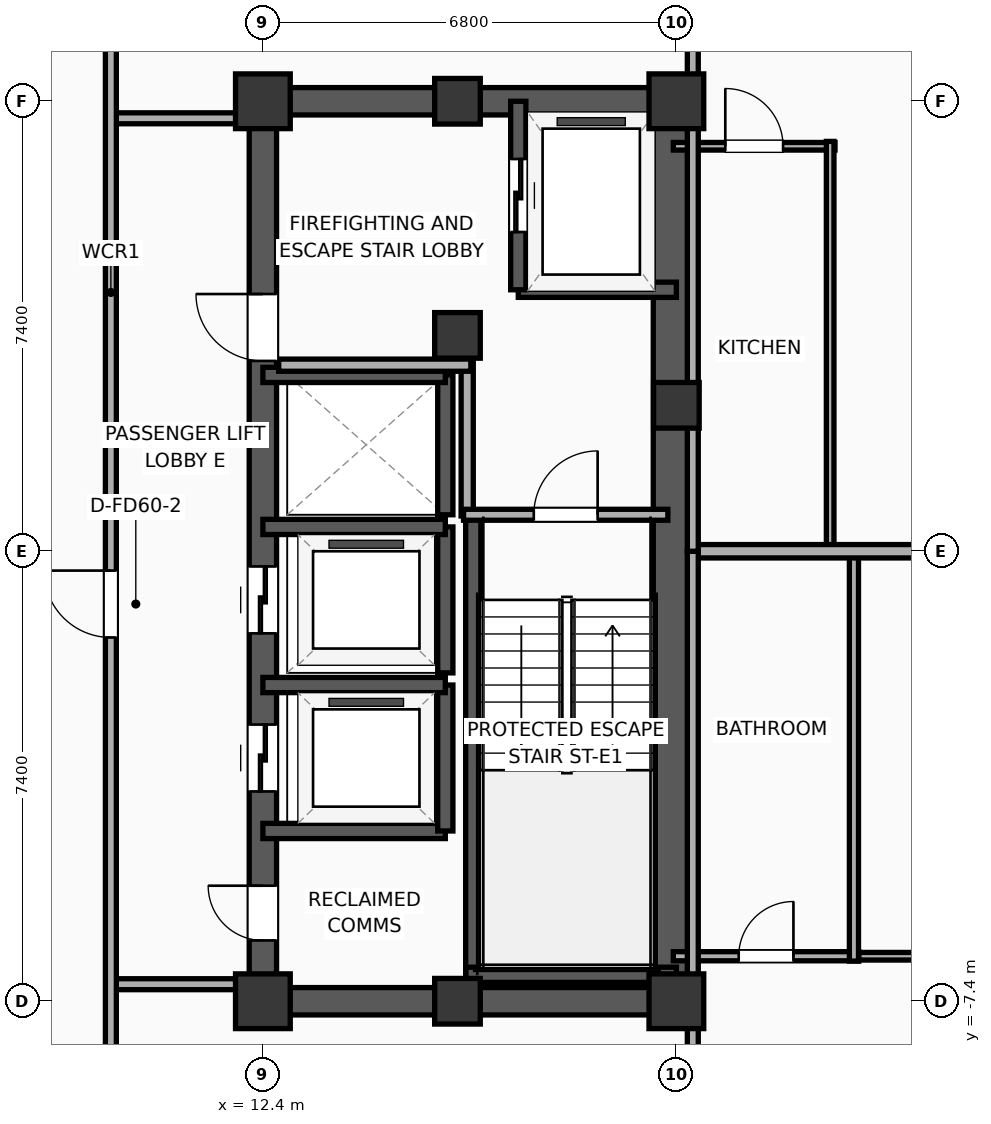
"""IFC4 building model, lengths in metres.
Left out: names, types, materials, properties, quantities, classifications, styles, units other than length and angle.
Written with IfcOpenShell. Run it as: python <this file> out.ifc"""

import sys

from ifc_helpers import new_model, si_unit, direction, frame, frame_2d, origin, origin_2d, place, context, subcontext, project, spatial, rectangle, extrude, element, fill, save


model = new_model("IFC4")
c1 = context("Model", 3, precision=1e-05, world=origin(), true_north=direction((0.0, 1.0)))
c2 = subcontext(c1, "Body", "Model", "MODEL_VIEW")
j1 = project(units=[si_unit("LENGTHUNIT", "METRE"), si_unit("PLANEANGLEUNIT", "RADIAN")], contexts=[c1])
p1 = place(None, origin())
s1 = spatial("IfcSite", under=j1, at=p1, CompositionType="ELEMENT")
p2 = place(p1, origin())
s2 = spatial("IfcBuilding", under=s1, at=p2, CompositionType="ELEMENT")
p3 = place(p2, frame((0.0, 0.0, 144.3)))
s3 = spatial("IfcBuildingStorey", under=s2, at=p3, CompositionType="ELEMENT", Elevation=144.3)
p4 = place(p3, frame((12.4, -7.4, 0.0), z_axis=(0.0, 0.0, 1.0), x_axis=(1.0, 0.0, 0.0)))
e1 = element("IfcColumn", 1, at=p4, inside=s3, PredefinedType="COLUMN", context=c2, shape_type="SweptSolid", body=[
    extrude(rectangle(XDim=0.9, YDim=0.9, at=origin_2d()), origin(), (0.0, 0.0, 1.0), 3.9),
])
p5 = place(p3, frame((15.6, 3.55, 0.0), z_axis=(0.0, 0.0, 1.0), x_axis=(1.0, 0.0, 0.0)))
e2 = element("IfcColumn", 2, at=p5, inside=s3, PredefinedType="COLUMN", context=c2, shape_type="SweptSolid", body=[
    extrude(rectangle(XDim=0.75, YDim=0.75, at=origin_2d()), origin(), (0.0, 0.0, 1.0), 3.9),
])
p6 = place(p3, frame((12.4, 7.4, 0.0), z_axis=(0.0, 0.0, 1.0), x_axis=(1.0, 0.0, 0.0)))
e3 = element("IfcColumn", 3, at=p6, inside=s3, PredefinedType="COLUMN", context=c2, shape_type="SweptSolid", body=[
    extrude(rectangle(XDim=0.9, YDim=0.9, at=origin_2d()), origin(), (0.0, 0.0, 1.0), 3.9),
])
for number, where, z_axis, x_axis in (
    (4, (15.6, -7.4, 0.0), (0.0, 0.0, 1.0), (1.0, 0.0, 0.0)),
    (5, (15.6, 7.4, 0.0), (0.0, 0.0, 1.0), (1.0, 0.0, 0.0)),
):
    element("IfcColumn", number, at=place(p3, frame(where, z_axis=z_axis, x_axis=x_axis)), inside=s3, PredefinedType="COLUMN", context=c2, shape_type="SweptSolid", body=[
        extrude(rectangle(XDim=0.75, YDim=0.75, at=origin_2d()), origin(), (0.0, 0.0, 1.0), 3.9),
    ])
p7 = place(p3, frame((19.2, -7.4, 0.0), z_axis=(0.0, 0.0, 1.0), x_axis=(1.0, 0.0, 0.0)))
e6 = element("IfcColumn", 6, at=p7, inside=s3, PredefinedType="COLUMN", context=c2, shape_type="SweptSolid", body=[
    extrude(rectangle(XDim=0.9, YDim=0.9, at=origin_2d()), origin(), (0.0, 0.0, 1.0), 3.9),
])
p8 = place(p3, frame((19.2, 2.4, 0.0), z_axis=(0.0, 0.0, 1.0), x_axis=(1.0, 0.0, 0.0)))
e7 = element("IfcColumn", 7, at=p8, inside=s3, PredefinedType="COLUMN", context=c2, shape_type="SweptSolid", body=[
    extrude(rectangle(XDim=0.75, YDim=0.75, at=origin_2d()), origin(), (0.0, 0.0, 1.0), 3.9),
])
p9 = place(p3, frame((19.2, 7.4, 0.0), z_axis=(0.0, 0.0, 1.0), x_axis=(1.0, 0.0, 0.0)))
e8 = element("IfcColumn", 8, at=p9, inside=s3, PredefinedType="COLUMN", context=c2, shape_type="SweptSolid", body=[
    extrude(rectangle(XDim=0.9, YDim=0.9, at=origin_2d()), origin(), (0.0, 0.0, 1.0), 3.9),
])
for number, where, z_axis, x_axis in (
    (9, (12.175, -7.4, 0.0), (0.0, 0.0, 1.0), (1.0, 0.0, 0.0)),
    (10, (12.175, 7.4, 0.0), (0.0, 0.0, 1.0), (1.0, 0.0, 0.0)),
):
    element("IfcWall", number, at=place(p3, frame(where, z_axis=z_axis, x_axis=x_axis)), inside=s3, PredefinedType="SHEAR", context=c2, shape_type="SweptSolid", body=[
        extrude(rectangle(XDim=7.25, YDim=0.45, at=frame_2d((3.625, 0.0))), origin(), (0.0, 0.0, 1.0), 3.65),
    ])
p10 = place(p3, frame((12.4, -7.4, 0.0), z_axis=(0.0, 0.0, 1.0), x_axis=(0.0, 1.0, 0.0)))
e11 = element("IfcWall", 11, at=p10, inside=s3, PredefinedType="SHEAR", context=c2, shape_type="SweptSolid", body=[
    extrude(rectangle(XDim=14.8, YDim=0.45, at=frame_2d((7.4, 0.0))), origin(), (0.0, 0.0, 1.0), 3.65),
])
p11 = place(p10, frame((3.45, 0.0, 0.0)))
e12 = element("IfcOpeningElement", 12, at=p11, cuts=e11, PredefinedType="OPENING", context=c2, shape_type="SweptSolid", body=[
    extrude(rectangle(XDim=1.1, YDim=2.05, at=frame_2d((0.55, 1.025))), frame((0.0, 0.235, 0.0), z_axis=(0.0, -1.0, 0.0), x_axis=(1.0, 0.0, 0.0)), (0.0, 0.0, 1.0), 0.47),
])
p12 = place(p10, frame((6.05, 0.0, 0.0)))
e13 = element("IfcOpeningElement", 13, at=p12, cuts=e11, PredefinedType="OPENING", context=c2, shape_type="SweptSolid", body=[
    extrude(rectangle(XDim=1.1, YDim=2.05, at=frame_2d((0.55, 1.025))), frame((0.0, 0.235, 0.0), z_axis=(0.0, -1.0, 0.0), x_axis=(1.0, 0.0, 0.0)), (0.0, 0.0, 1.0), 0.47),
])
p13 = place(p10, frame((10.53, 0.0, 0.0)))
e14 = element("IfcOpeningElement", 14, at=p13, cuts=e11, PredefinedType="OPENING", context=c2, shape_type="SweptSolid", body=[
    extrude(rectangle(XDim=1.1, YDim=2.05, at=frame_2d((0.55, 1.025))), frame((0.0, 0.235, 0.0), z_axis=(0.0, -1.0, 0.0), x_axis=(1.0, 0.0, 0.0)), (0.0, 0.0, 1.0), 0.47),
])
p14 = place(p10, frame((1.0, 0.0, 0.0)))
e15 = element("IfcOpeningElement", 15, at=p14, cuts=e11, PredefinedType="OPENING", context=c2, shape_type="SweptSolid", body=[
    extrude(rectangle(XDim=0.9, YDim=2.05, at=frame_2d((0.45, 1.025))), frame((0.0, 0.235, 0.0), z_axis=(0.0, -1.0, 0.0), x_axis=(1.0, 0.0, 0.0)), (0.0, 0.0, 1.0), 0.47),
])
p15 = place(p3, frame((19.145, -7.4, 0.0), z_axis=(0.0, 0.0, 1.0), x_axis=(0.0, 1.0, 0.0)))
e16 = element("IfcWall", 16, at=p15, inside=s3, PredefinedType="SHEAR", context=c2, shape_type="SweptSolid", body=[
    extrude(rectangle(XDim=14.8, YDim=0.65, at=frame_2d((7.4, 0.0))), origin(), (0.0, 0.0, 1.0), 3.65),
])
p16 = place(p3, frame((15.86, -7.085, 0.0), z_axis=(0.0, 0.0, 1.0), x_axis=(0.0, 1.0, 0.0)))
e17 = element("IfcWall", 17, at=p16, inside=s3, PredefinedType="SOLIDWALL", context=c2, shape_type="SweptSolid", body=[
    extrude(rectangle(XDim=7.685, YDim=0.25, at=frame_2d((3.843, 0.0))), origin(), (0.0, 0.0, 1.0), 3.65),
])
p17 = place(p3, frame((15.74, -6.965, 0.0), z_axis=(0.0, 0.0, 1.0), x_axis=(1.0, 0.0, 0.0)))
e18 = element("IfcWall", 18, at=p17, inside=s3, PredefinedType="SOLIDWALL", context=c2, shape_type="SweptSolid", body=[
    extrude(rectangle(XDim=3.46, YDim=0.25, at=frame_2d((1.73, 0.0))), origin(), (0.0, 0.0, 1.0), 3.65),
])
p18 = place(p3, frame((16.6, 4.3, 0.0), z_axis=(0.0, 0.0, 1.0), x_axis=(1.0, 0.0, 0.0)))
e19 = element("IfcWall", 19, at=p18, inside=s3, PredefinedType="SOLIDWALL", context=c2, shape_type="SweptSolid", body=[
    extrude(rectangle(XDim=2.6, YDim=0.25, at=frame_2d((1.3, 0.0))), origin(), (0.0, 0.0, 1.0), 3.65),
])
p19 = place(p3, frame((16.6, 7.4, 0.0), z_axis=(0.0, 0.0, 1.0), x_axis=(0.0, -1.0, 0.0)))
e20 = element("IfcWall", 20, at=p19, inside=s3, PredefinedType="SOLIDWALL", context=c2, shape_type="SweptSolid", body=[
    extrude(rectangle(XDim=3.1, YDim=0.25, at=frame_2d((1.55, 0.0))), origin(), (0.0, 0.0, 1.0), 3.65),
])
p20 = place(p19, frame((0.95, 0.0, 0.0)))
e21 = element("IfcOpeningElement", 21, at=p20, cuts=e20, PredefinedType="OPENING", context=c2, shape_type="SweptSolid", body=[
    extrude(rectangle(XDim=1.2, YDim=2.05, at=frame_2d((0.6, 1.025))), frame((0.0, 0.135, 0.0), z_axis=(0.0, -1.0, 0.0), x_axis=(1.0, 0.0, 0.0)), (0.0, 0.0, 1.0), 0.27),
])
p21 = place(p3, frame((12.4, -4.6, 0.0), z_axis=(0.0, 0.0, 1.0), x_axis=(1.0, 0.0, 0.0)))
e22 = element("IfcWall", 22, at=p21, inside=s3, PredefinedType="SOLIDWALL", context=c2, shape_type="SweptSolid", body=[
    extrude(rectangle(XDim=3.0, YDim=0.25, at=frame_2d((1.5, 0.0))), origin(), (0.0, 0.0, 1.0), 3.65),
])
p22 = place(p3, frame((15.4, -4.6, 0.0), z_axis=(0.0, 0.0, 1.0), x_axis=(0.0, 1.0, 0.0)))
e23 = element("IfcWall", 23, at=p22, inside=s3, PredefinedType="SOLIDWALL", context=c2, shape_type="SweptSolid", body=[
    extrude(rectangle(XDim=2.4, YDim=0.25, at=frame_2d((1.2, 0.0))), origin(), (0.0, 0.0, 1.0), 3.65),
])
p23 = place(p3, frame((15.4, -2.2, 0.0), z_axis=(0.0, 0.0, 1.0), x_axis=(-1.0, 0.0, 0.0)))
e24 = element("IfcWall", 24, at=p23, inside=s3, PredefinedType="SOLIDWALL", context=c2, shape_type="SweptSolid", body=[
    extrude(rectangle(XDim=3.0, YDim=0.25, at=frame_2d((1.5, 0.0))), origin(), (0.0, 0.0, 1.0), 3.65),
])
p24 = place(p3, frame((15.4, -2.0, 0.0), z_axis=(0.0, 0.0, 1.0), x_axis=(0.0, 1.0, 0.0)))
e25 = element("IfcWall", 25, at=p24, inside=s3, PredefinedType="SOLIDWALL", context=c2, shape_type="SweptSolid", body=[
    extrude(rectangle(XDim=2.4, YDim=0.25, at=frame_2d((1.2, 0.0))), origin(), (0.0, 0.0, 1.0), 3.65),
])
p25 = place(p3, frame((15.4, 0.4, 0.0), z_axis=(0.0, 0.0, 1.0), x_axis=(-1.0, 0.0, 0.0)))
e26 = element("IfcWall", 26, at=p25, inside=s3, PredefinedType="SOLIDWALL", context=c2, shape_type="SweptSolid", body=[
    extrude(rectangle(XDim=3.0, YDim=0.25, at=frame_2d((1.5, 0.0))), origin(), (0.0, 0.0, 1.0), 3.65),
])
p26 = place(p3, frame((15.4, 0.6, 0.0), z_axis=(0.0, 0.0, 1.0), x_axis=(0.0, 1.0, 0.0)))
e27 = element("IfcWall", 27, at=p26, inside=s3, PredefinedType="SOLIDWALL", context=c2, shape_type="SweptSolid", body=[
    extrude(rectangle(XDim=2.3, YDim=0.25, at=frame_2d((1.15, 0.0))), origin(), (0.0, 0.0, 1.0), 3.65),
])
p27 = place(p3, frame((15.4, 2.9, 0.0), z_axis=(0.0, 0.0, 1.0), x_axis=(-1.0, 0.0, 0.0)))
e28 = element("IfcWall", 28, at=p27, inside=s3, PredefinedType="SOLIDWALL", context=c2, shape_type="SweptSolid", body=[
    extrude(rectangle(XDim=3.0, YDim=0.25, at=frame_2d((1.5, 0.0))), origin(), (0.0, 0.0, 1.0), 3.65),
])
p28 = place(p3, frame((15.76, 0.58, 0.0), z_axis=(0.0, 0.0, 1.0), x_axis=(0.0, 1.0, 0.0)))
e29 = element("IfcWall", 29, at=p28, inside=s3, PredefinedType="PARTITIONING", context=c2, shape_type="SweptSolid", body=[
    extrude(rectangle(XDim=2.52, YDim=0.2, at=frame_2d((1.26, 0.0))), origin(), (0.0, 0.0, 1.0), 3.65),
])
p29 = place(p3, frame((12.66, 3.06, 0.0), z_axis=(0.0, 0.0, 1.0), x_axis=(1.0, 0.0, 0.0)))
e30 = element("IfcWall", 30, at=p29, inside=s3, PredefinedType="PARTITIONING", context=c2, shape_type="SweptSolid", body=[
    extrude(rectangle(XDim=3.16, YDim=0.2, at=frame_2d((1.58, 0.0))), origin(), (0.0, 0.0, 1.0), 3.65),
])
p30 = place(p3, frame((15.7, 0.6, 0.0), z_axis=(0.0, 0.0, 1.0), x_axis=(1.0, 0.0, 0.0)))
e31 = element("IfcWall", 31, at=p30, inside=s3, PredefinedType="PARTITIONING", context=c2, shape_type="SweptSolid", body=[
    extrude(rectangle(XDim=3.36, YDim=0.18, at=frame_2d((1.68, 0.0))), origin(), (0.0, 0.0, 1.0), 3.65),
])
p31 = place(p30, frame((1.155, 0.0, 0.0)))
e32 = element("IfcOpeningElement", 32, at=p31, cuts=e31, PredefinedType="OPENING", context=c2, shape_type="SweptSolid", body=[
    extrude(rectangle(XDim=1.05, YDim=2.05, at=frame_2d((0.525, 1.025))), frame((0.0, 0.1, 0.0), z_axis=(0.0, -1.0, 0.0), x_axis=(1.0, 0.0, 0.0)), (0.0, 0.0, 1.0), 0.2),
])
for number, where, z_axis, x_axis in (
    (33, (9.88, 7.12, 0.0), (0.0, 0.0, 1.0), (1.0, 0.0, 0.0)),
    (34, (9.88, -7.12, 0.0), (0.0, 0.0, 1.0), (1.0, 0.0, 0.0)),
):
    element("IfcWall", number, at=place(p3, frame(where, z_axis=z_axis, x_axis=x_axis)), inside=s3, PredefinedType="PARTITIONING", context=c2, shape_type="SweptSolid", body=[
        extrude(rectangle(XDim=2.27, YDim=0.18, at=frame_2d((1.135, 0.0))), origin(), (0.0, 0.0, 1.0), 3.65),
    ])
p32 = place(p3, frame((9.9, -8.68, 0.0), z_axis=(0.0, 0.0, 1.0), x_axis=(0.0, 1.0, 0.0)))
e35 = element("IfcWall", 35, at=p32, inside=s3, PredefinedType="PARTITIONING", context=c2, shape_type="SweptSolid", body=[
    extrude(rectangle(XDim=17.36, YDim=0.18, at=frame_2d((8.68, 0.0))), origin(), (0.0, 0.0, 1.0), 3.65),
])
p33 = place(p32, frame((7.262, 0.0, 0.0)))
e36 = element("IfcOpeningElement", 36, at=p33, cuts=e35, PredefinedType="OPENING", context=c2, shape_type="SweptSolid", body=[
    extrude(rectangle(XDim=1.1, YDim=2.05, at=frame_2d((0.55, 1.025))), frame((0.0, 0.1, 0.0), z_axis=(0.0, -1.0, 0.0), x_axis=(1.0, 0.0, 0.0)), (0.0, 0.0, 1.0), 0.2),
])
p34 = place(p3, frame((22.06, -6.66, 0.0), z_axis=(0.0, 0.0, 1.0), x_axis=(1.0, 0.0, 0.0)))
e37 = element("IfcWall", 37, at=p34, inside=s3, PredefinedType="PARTITIONING", context=c2, shape_type="SweptSolid", body=[
    extrude(rectangle(XDim=5.321, YDim=0.125, at=frame_2d((2.661, 0.0))), origin(), (0.0, 0.0, 1.0), 2.54),
])
p35 = place(p34, frame((1.945, 0.0, 0.0)))
e38 = element("IfcOpeningElement", 38, at=p35, cuts=e37, PredefinedType="OPENING", context=c2, shape_type="SweptSolid", body=[
    extrude(rectangle(XDim=0.9, YDim=2.05, at=frame_2d((0.45, 1.025))), frame((0.0, 0.073, 0.0), z_axis=(0.0, -1.0, 0.0), x_axis=(1.0, 0.0, 0.0)), (0.0, 0.0, 1.0), 0.145),
])
p36 = place(p3, frame((19.15, -6.66, 0.0), z_axis=(0.0, 0.0, 1.0), x_axis=(1.0, 0.0, 0.0)))
e39 = element("IfcWall", 39, at=p36, inside=s3, PredefinedType="PLUMBINGWALL", context=c2, shape_type="SweptSolid", body=[
    extrude(rectangle(XDim=3.05, YDim=0.15, at=frame_2d((1.525, 0.0))), origin(), (0.0, 0.0, 1.0), 2.54),
])
p37 = place(p36, frame((1.075, 0.0, 0.0)))
e40 = element("IfcOpeningElement", 40, at=p37, cuts=e39, PredefinedType="OPENING", context=c2, shape_type="SweptSolid", body=[
    extrude(rectangle(XDim=0.9, YDim=2.05, at=frame_2d((0.45, 1.025))), frame((0.0, 0.085, 0.0), z_axis=(0.0, -1.0, 0.0), x_axis=(1.0, 0.0, 0.0)), (0.0, 0.0, 1.0), 0.17),
])
p38 = place(p3, frame((22.12, -6.74, 0.0), z_axis=(0.0, 0.0, 1.0), x_axis=(0.0, 1.0, 0.0)))
e41 = element("IfcWall", 41, at=p38, inside=s3, PredefinedType="PLUMBINGWALL", context=c2, shape_type="SweptSolid", body=[
    extrude(rectangle(XDim=6.72, YDim=0.15, at=frame_2d((3.36, 0.0))), origin(), (0.0, 0.0, 1.0), 3.65),
])
p39 = place(p3, frame((19.15, 6.66, 0.0), z_axis=(0.0, 0.0, 1.0), x_axis=(1.0, 0.0, 0.0)))
e42 = element("IfcWall", 42, at=p39, inside=s3, PredefinedType="PARTITIONING", context=c2, shape_type="SweptSolid", body=[
    extrude(rectangle(XDim=2.659, YDim=0.125, at=frame_2d((1.33, 0.0))), origin(), (0.0, 0.0, 1.0), 3.65),
])
p40 = place(p39, frame((0.854, 0.0, 0.0)))
e43 = element("IfcOpeningElement", 43, at=p40, cuts=e42, PredefinedType="OPENING", context=c2, shape_type="SweptSolid", body=[
    extrude(rectangle(XDim=0.95, YDim=2.05, at=frame_2d((0.475, 1.025))), frame((0.0, 0.073, 0.0), z_axis=(0.0, -1.0, 0.0), x_axis=(1.0, 0.0, 0.0)), (0.0, 0.0, 1.0), 0.145),
])
p41 = place(p3, frame((21.729, 0.02, 0.0), z_axis=(0.0, 0.0, 1.0), x_axis=(0.0, 1.0, 0.0)))
e44 = element("IfcWall", 44, at=p41, inside=s3, PredefinedType="PARTITIONING", context=c2, shape_type="SweptSolid", body=[
    extrude(rectangle(XDim=6.72, YDim=0.125, at=frame_2d((3.36, 0.0))), origin(), (0.0, 0.0, 1.0), 3.65),
])
p42 = place(p3, frame((19.47, 0.0, 0.0), z_axis=(0.0, 0.0, 1.0), x_axis=(1.0, 0.0, 0.0)))
e45 = element("IfcWall", 45, at=p42, inside=s3, PredefinedType="PARTITIONING", context=c2, shape_type="SweptSolid", body=[
    extrude(rectangle(XDim=7.06, YDim=0.22, at=frame_2d((3.53, 0.0))), origin(), (0.0, 0.0, 1.0), 3.65),
])
p43 = place(p3, frame((19.47, -18.559, 0.0), z_axis=(0.0, 0.0, 1.0), x_axis=(0.0, 1.0, 0.0)))
e46 = element("IfcWall", 46, at=p43, inside=s3, PredefinedType="PARTITIONING", context=c2, shape_type="SweptSolid", body=[
    extrude(rectangle(XDim=18.559, YDim=0.18, at=frame_2d((9.279, 0.0))), origin(), (0.0, 0.0, 1.0), 3.65),
])
p44 = place(p43, frame((8.779, 0.0, 0.0)))
e47 = element("IfcOpeningElement", 47, at=p44, cuts=e46, PredefinedType="OPENING", context=c2, shape_type="SweptSolid", body=[
    extrude(rectangle(XDim=0.9, YDim=2.05, at=frame_2d((0.45, 1.025))), frame((0.0, 0.1, 0.0), z_axis=(0.0, -1.0, 0.0), x_axis=(1.0, 0.0, 0.0)), (0.0, 0.0, 1.0), 0.2),
])
p45 = place(p3, frame((19.47, 0.0, 0.0), z_axis=(0.0, 0.0, 1.0), x_axis=(0.0, 1.0, 0.0)))
e48 = element("IfcWall", 48, at=p45, inside=s3, PredefinedType="PARTITIONING", context=c2, shape_type="SweptSolid", body=[
    extrude(rectangle(XDim=22.124, YDim=0.18, at=frame_2d((11.062, 0.0))), origin(), (0.0, 0.0, 1.0), 2.54),
])
p46 = place(p45, frame((8.88, 0.0, 0.0)))
e49 = element("IfcOpeningElement", 49, at=p46, cuts=e48, PredefinedType="OPENING", context=c2, shape_type="SweptSolid", body=[
    extrude(rectangle(XDim=0.9, YDim=2.05, at=frame_2d((0.45, 1.025))), frame((0.0, 0.1, 0.0), z_axis=(0.0, -1.0, 0.0), x_axis=(1.0, 0.0, 0.0)), (0.0, 0.0, 1.0), 0.2),
])
p47 = place(p20, origin())
e50 = element("IfcDoor", 50, at=p47, inside=s3, OperationType="SLIDING_TO_LEFT", PredefinedType="DOOR", context=c2, shape_type="SweptSolid", body=[
    extrude(rectangle(XDim=1.2, YDim=2.05, at=frame_2d((0.6, 1.025))), frame((0.0, 0.025, 0.0), z_axis=(0.0, -1.0, 0.0), x_axis=(1.0, 0.0, 0.0)), (0.0, 0.0, 1.0), 0.05),
])
fill(e21, e50)
p48 = place(p11, origin())
e51 = element("IfcDoor", 51, at=p48, inside=s3, OperationType="SLIDING_TO_LEFT", PredefinedType="DOOR", context=c2, shape_type="SweptSolid", body=[
    extrude(rectangle(XDim=1.1, YDim=2.05, at=frame_2d((0.55, 1.025))), frame((0.0, 0.025, 0.0), z_axis=(0.0, -1.0, 0.0), x_axis=(1.0, 0.0, 0.0)), (0.0, 0.0, 1.0), 0.05),
])
fill(e12, e51)
p49 = place(p12, origin())
e52 = element("IfcDoor", 52, at=p49, inside=s3, OperationType="SLIDING_TO_LEFT", PredefinedType="DOOR", context=c2, shape_type="SweptSolid", body=[
    extrude(rectangle(XDim=1.1, YDim=2.05, at=frame_2d((0.55, 1.025))), frame((0.0, 0.025, 0.0), z_axis=(0.0, -1.0, 0.0), x_axis=(1.0, 0.0, 0.0)), (0.0, 0.0, 1.0), 0.05),
])
fill(e13, e52)
p50 = place(p31, origin())
e53 = element("IfcDoor", 53, at=p50, inside=s3, OperationType="SINGLE_SWING_RIGHT", PredefinedType="DOOR", context=c2, shape_type="SweptSolid", body=[
    extrude(rectangle(XDim=1.05, YDim=2.05, at=frame_2d((0.525, 1.025))), frame((0.0, 0.025, 0.0), z_axis=(0.0, -1.0, 0.0), x_axis=(1.0, 0.0, 0.0)), (0.0, 0.0, 1.0), 0.05),
])
fill(e32, e53)
p51 = place(p33, origin())
e54 = element("IfcDoor", 54, at=p51, inside=s3, OperationType="SINGLE_SWING_RIGHT", PredefinedType="DOOR", context=c2, shape_type="SweptSolid", body=[
    extrude(rectangle(XDim=1.1, YDim=2.05, at=frame_2d((0.55, 1.025))), frame((0.0, 0.025, 0.0), z_axis=(0.0, -1.0, 0.0), x_axis=(1.0, 0.0, 0.0)), (0.0, 0.0, 1.0), 0.05),
])
fill(e36, e54)
p52 = place(p37, origin())
e55 = element("IfcDoor", 55, at=p52, inside=s3, OperationType="SINGLE_SWING_RIGHT", PredefinedType="DOOR", context=c2, shape_type="SweptSolid", body=[
    extrude(rectangle(XDim=0.9, YDim=2.05, at=frame_2d((0.45, 1.025))), frame((0.0, 0.025, 0.0), z_axis=(0.0, -1.0, 0.0), x_axis=(1.0, 0.0, 0.0)), (0.0, 0.0, 1.0), 0.05),
])
fill(e40, e55)
p53 = place(p40, origin())
e56 = element("IfcDoor", 56, at=p53, inside=s3, OperationType="SINGLE_SWING_LEFT", PredefinedType="DOOR", context=c2, shape_type="SweptSolid", body=[
    extrude(rectangle(XDim=0.95, YDim=2.05, at=frame_2d((0.475, 1.025))), frame((0.0, 0.025, 0.0), z_axis=(0.0, -1.0, 0.0), x_axis=(1.0, 0.0, 0.0)), (0.0, 0.0, 1.0), 0.05),
])
fill(e43, e56)
p54 = place(p13, origin())
e57 = element("IfcDoor", 57, at=p54, inside=s3, OperationType="SINGLE_SWING_RIGHT", PredefinedType="DOOR", context=c2, shape_type="SweptSolid", body=[
    extrude(rectangle(XDim=1.1, YDim=2.05, at=frame_2d((0.55, 1.025))), frame((0.0, 0.025, 0.0), z_axis=(0.0, -1.0, 0.0), x_axis=(1.0, 0.0, 0.0)), (0.0, 0.0, 1.0), 0.05),
])
fill(e14, e57)
p55 = place(p14, origin())
e58 = element("IfcDoor", 58, at=p55, inside=s3, OperationType="SINGLE_SWING_RIGHT", PredefinedType="DOOR", context=c2, shape_type="SweptSolid", body=[
    extrude(rectangle(XDim=0.9, YDim=2.05, at=frame_2d((0.45, 1.025))), frame((0.0, 0.025, 0.0), z_axis=(0.0, -1.0, 0.0), x_axis=(1.0, 0.0, 0.0)), (0.0, 0.0, 1.0), 0.05),
])
fill(e15, e58)
save(model, sys.argv[1])
